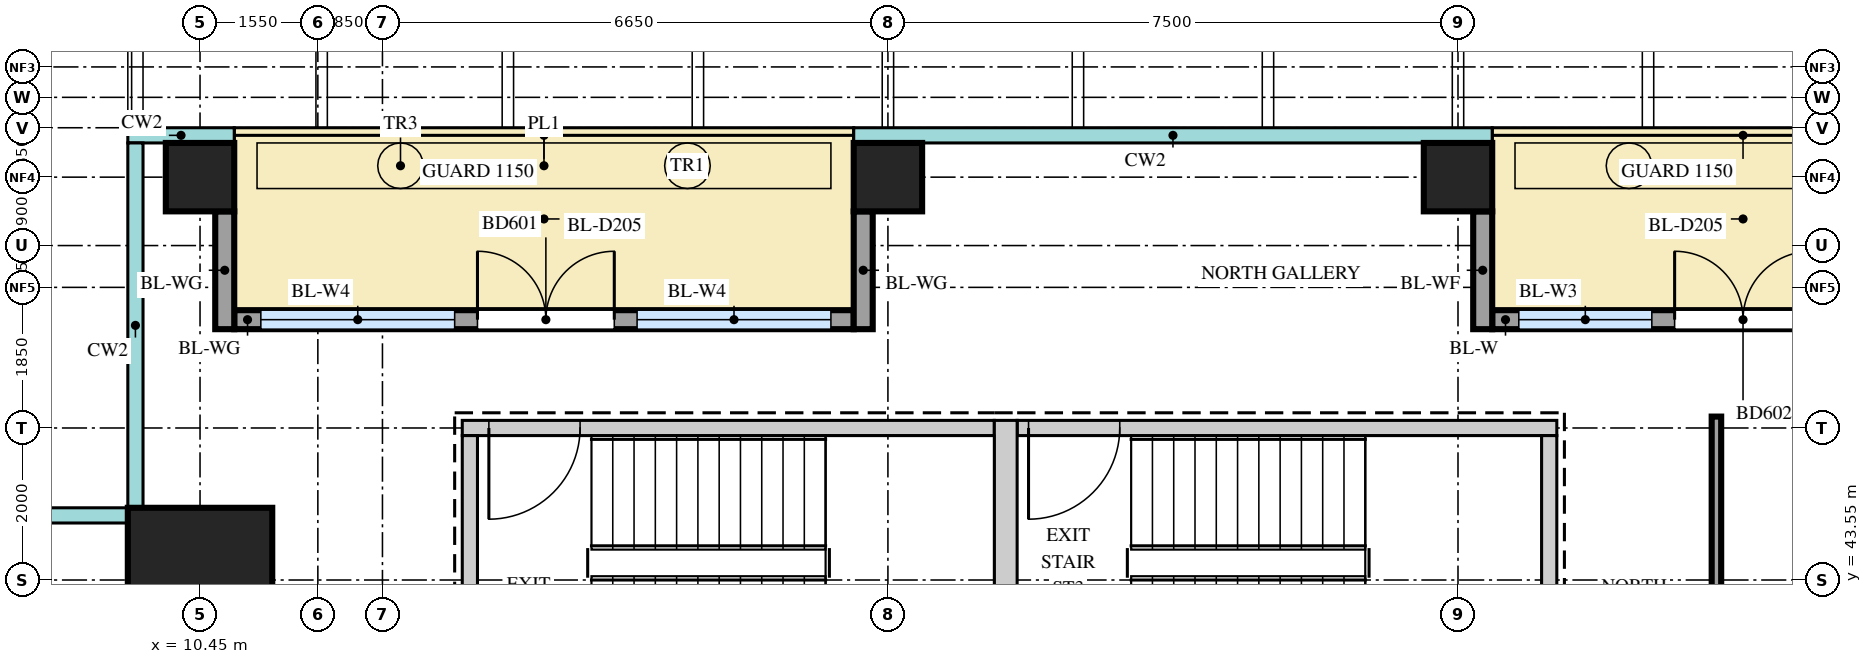
"""IFC4 building model, lengths in metres.
Left out: names, types, materials, properties, quantities, classifications, styles, units other than length and angle.
Written with IfcOpenShell. Run it as: python <this file> out.ifc"""

import sys

from ifc_helpers import new_model, si_unit, direction, frame, frame_2d, origin, origin_2d, place, context, subcontext, project, spatial, rectangle, extrude, source, transform, mapped, element, fill, save


model = new_model("IFC4")
c1 = context("Model", 3, precision=1e-05, world=origin(), true_north=direction((0.0, 1.0)))
c2 = subcontext(c1, "Body", "Model", "MODEL_VIEW")
j1 = project(units=[si_unit("LENGTHUNIT", "METRE"), si_unit("PLANEANGLEUNIT", "RADIAN")], contexts=[c1])
p1 = place(None, origin())
s1 = spatial("IfcSite", under=j1, at=p1, CompositionType="ELEMENT")
p2 = place(p1, origin())
s2 = spatial("IfcBuilding", under=s1, at=p2, CompositionType="ELEMENT")
p3 = place(p2, frame((0.0, 0.0, 266.2)))
s3 = spatial("IfcBuildingStorey", under=s2, at=p3, CompositionType="ELEMENT", Elevation=266.2)
m1 = source(origin(), c2, "Body", "SweptSolid", [
    extrude(rectangle(XDim=7.0, YDim=0.2, at=frame_2d((3.5, 0.0))), origin(), (0.0, 0.0, 1.0), 3.75),
])
p4 = place(p3, frame((13.9, 45.55, 0.0), z_axis=(0.0, 0.0, 1.0), x_axis=(1.0, 0.0, 0.0)))
e1 = element("IfcWall", 1, at=p4, inside=s3, PredefinedType="SHEAR", context=c2, shape_type="MappedRepresentation", body=[
    mapped(m1, transform((0.0, 0.0, 0.0))),
])
m2 = source(origin(), c2, "Body", "SweptSolid", [
    extrude(rectangle(XDim=1.2, YDim=2.1, at=frame_2d((0.6, 1.05))), frame((0.0, 0.11, 0.0), z_axis=(0.0, -1.0, 0.0), x_axis=(1.0, 0.0, 0.0)), (0.0, 0.0, 1.0), 0.22),
])
p5 = place(p4, frame((0.35, 0.0, 0.0)))
e2 = element("IfcOpeningElement", 2, at=p5, cuts=e1, PredefinedType="OPENING", context=c2, shape_type="MappedRepresentation", body=[
    mapped(m2, transform((0.0, 0.0, 0.0))),
])
m3 = source(origin(), c2, "Body", "SweptSolid", [
    extrude(rectangle(XDim=7.1, YDim=0.2, at=frame_2d((3.55, 0.0))), origin(), (0.0, 0.0, 1.0), 3.75),
])
p6 = place(p3, frame((21.2, 45.55, 0.0), z_axis=(0.0, 0.0, 1.0), x_axis=(1.0, 0.0, 0.0)))
e3 = element("IfcWall", 3, at=p6, inside=s3, PredefinedType="SHEAR", context=c2, shape_type="MappedRepresentation", body=[
    mapped(m3, transform((0.0, 0.0, 0.0))),
])
p7 = place(p6, frame((0.15, 0.0, 0.0)))
e4 = element("IfcOpeningElement", 4, at=p7, cuts=e3, PredefinedType="OPENING", context=c2, shape_type="MappedRepresentation", body=[
    mapped(m2, transform((0.0, 0.0, 0.0))),
])
m4 = source(origin(), c2, "Body", "SweptSolid", [
    extrude(rectangle(XDim=3.75, YDim=0.3, at=frame_2d((1.875, 0.0))), origin(), (0.0, 0.0, 1.0), 3.75),
])
p8 = place(p3, frame((21.05, 41.9, 0.0), z_axis=(0.0, 0.0, 1.0), x_axis=(0.0, 1.0, 0.0)))
e5 = element("IfcWall", 5, at=p8, inside=s3, PredefinedType="SHEAR", context=c2, shape_type="MappedRepresentation", body=[
    mapped(m4, transform((0.0, 0.0, 0.0))),
])
m5 = source(origin(), c2, "Body", "SweptSolid", [
    extrude(rectangle(XDim=3.35, YDim=0.2, at=frame_2d((1.675, 0.0))), origin(), (0.0, 0.0, 1.0), 3.75),
])
for number, where, z_axis, x_axis in (
    (6, (14.0, 42.1, 0.0), (0.0, 0.0, 1.0), (0.0, 1.0, 0.0)),
    (7, (28.2, 42.1, 0.0), (0.0, 0.0, 1.0), (0.0, 1.0, 0.0)),
):
    element("IfcWall", number, at=place(p3, frame(where, z_axis=z_axis, x_axis=x_axis)), inside=s3, PredefinedType="SHEAR", context=c2, shape_type="MappedRepresentation", body=[
        mapped(m5, transform((0.0, 0.0, 0.0))),
    ])
m6 = source(origin(), c2, "Body", "SweptSolid", [
    extrude(rectangle(XDim=1.9, YDim=1.9, at=origin_2d()), origin(), (0.0, 0.0, 1.0), 4.0),
])
p9 = place(p3, frame((10.45, 43.55, 0.0), z_axis=(0.0, 0.0, 1.0), x_axis=(1.0, 0.0, 0.0)))
e8 = element("IfcColumn", 8, at=p9, inside=s3, PredefinedType="COLUMN", context=c2, shape_type="MappedRepresentation", body=[
    mapped(m6, transform((0.0, 0.0, 0.0))),
])
m7 = source(origin(), c2, "Body", "SweptSolid", [
    extrude(rectangle(XDim=0.9, YDim=0.9, at=origin_2d()), origin(), (0.0, 0.0, 1.0), 3.75),
])
for number, where, z_axis, x_axis in (
    (9, (10.45, 48.85, 0.0), (0.0, 0.0, 1.0), (1.0, 0.0, 0.0)),
    (10, (19.5, 48.85, 0.0), (0.0, 0.0, 1.0), (1.0, 0.0, 0.0)),
    (11, (27.0, 48.85, 0.0), (0.0, 0.0, 1.0), (1.0, 0.0, 0.0)),
):
    element("IfcColumn", number, at=place(p3, frame(where, z_axis=z_axis, x_axis=x_axis)), inside=s3, PredefinedType="COLUMN", context=c2, shape_type="MappedRepresentation", body=[
        mapped(m7, transform((0.0, 0.0, 0.0))),
    ])
m8 = source(origin(), c2, "Body", "SweptSolid", [
    extrude(rectangle(XDim=8.15, YDim=0.25, at=frame_2d((4.075, 0.0))), origin(), (0.0, 0.0, 1.0), 3.35),
])
p10 = place(p3, frame((10.9, 46.975, 0.0), z_axis=(0.0, 0.0, 1.0), x_axis=(1.0, 0.0, 0.0)))
e12 = element("IfcWall", 12, at=p10, inside=s3, PredefinedType="SOLIDWALL", context=c2, shape_type="MappedRepresentation", body=[
    mapped(m8, transform((0.0, 0.0, 0.0))),
])
m9 = source(origin(), c2, "Body", "SweptSolid", [
    extrude(rectangle(XDim=2.55, YDim=2.4, at=frame_2d((1.275, 1.2))), frame((0.0, 0.135, 0.0), z_axis=(0.0, -1.0, 0.0), x_axis=(1.0, 0.0, 0.0)), (0.0, 0.0, 1.0), 0.27),
])
p11 = place(p10, frame((0.35, 0.0, 0.0)))
e13 = element("IfcOpeningElement", 13, at=p11, cuts=e12, PredefinedType="OPENING", context=c2, shape_type="MappedRepresentation", body=[
    mapped(m9, transform((0.0, 0.0, 0.0))),
])
p12 = place(p10, frame((5.3, 0.0, 0.0)))
e14 = element("IfcOpeningElement", 14, at=p12, cuts=e12, PredefinedType="OPENING", context=c2, shape_type="MappedRepresentation", body=[
    mapped(m9, transform((0.0, 0.0, 0.0))),
])
m10 = source(origin(), c2, "Body", "SweptSolid", [
    extrude(rectangle(XDim=1.8, YDim=2.4, at=frame_2d((0.9, 1.2))), frame((0.0, 0.135, 0.0), z_axis=(0.0, -1.0, 0.0), x_axis=(1.0, 0.0, 0.0)), (0.0, 0.0, 1.0), 0.27),
])
p13 = place(p10, frame((3.2, 0.0, 0.0)))
e15 = element("IfcOpeningElement", 15, at=p13, cuts=e12, PredefinedType="OPENING", context=c2, shape_type="MappedRepresentation", body=[
    mapped(m10, transform((0.0, 0.0, 0.0))),
])
m11 = source(origin(), c2, "Body", "SweptSolid", [
    extrude(rectangle(XDim=1.55, YDim=0.25, at=frame_2d((0.775, 0.0))), origin(), (0.0, 0.0, 1.0), 3.35),
])
for number, where, z_axis, x_axis in (
    (16, (10.775, 48.4, 0.0), (0.0, 0.0, 1.0), (0.0, -1.0, 0.0)),
    (17, (19.175, 48.4, 0.0), (0.0, 0.0, 1.0), (0.0, -1.0, 0.0)),
):
    element("IfcWall", number, at=place(p3, frame(where, z_axis=z_axis, x_axis=x_axis)), inside=s3, PredefinedType="SOLIDWALL", context=c2, shape_type="MappedRepresentation", body=[
        mapped(m11, transform((0.0, 0.0, 0.0))),
    ])
m12 = source(origin(), c2, "Body", "SweptSolid", [
    extrude(rectangle(XDim=6.6, YDim=0.25, at=frame_2d((3.3, 0.0))), origin(), (0.0, 0.0, 1.0), 3.75),
])
p14 = place(p3, frame((27.45, 46.975, 0.0), z_axis=(0.0, 0.0, 1.0), x_axis=(1.0, 0.0, 0.0)))
e18 = element("IfcWall", 18, at=p14, inside=s3, PredefinedType="SOLIDWALL", context=c2, shape_type="MappedRepresentation", body=[
    mapped(m12, transform((0.0, 0.0, 0.0))),
])
m13 = source(origin(), c2, "Body", "SweptSolid", [
    extrude(rectangle(XDim=1.75, YDim=2.4, at=frame_2d((0.875, 1.2))), frame((0.0, 0.135, 0.0), z_axis=(0.0, -1.0, 0.0), x_axis=(1.0, 0.0, 0.0)), (0.0, 0.0, 1.0), 0.27),
])
p15 = place(p14, frame((0.35, 0.0, 0.0)))
e19 = element("IfcOpeningElement", 19, at=p15, cuts=e18, PredefinedType="OPENING", context=c2, shape_type="MappedRepresentation", body=[
    mapped(m13, transform((0.0, 0.0, 0.0))),
])
p16 = place(p14, frame((4.5, 0.0, 0.0)))
e20 = element("IfcOpeningElement", 20, at=p16, cuts=e18, PredefinedType="OPENING", context=c2, shape_type="MappedRepresentation", body=[
    mapped(m13, transform((0.0, 0.0, 0.0))),
])
p17 = place(p14, frame((2.4, 0.0, 0.0)))
e21 = element("IfcOpeningElement", 21, at=p17, cuts=e18, PredefinedType="OPENING", context=c2, shape_type="MappedRepresentation", body=[
    mapped(m10, transform((0.0, 0.0, 0.0))),
])
m14 = source(origin(), c2, "Body", "SweptSolid", [
    extrude(rectangle(XDim=1.55, YDim=0.25, at=frame_2d((0.775, 0.0))), origin(), (0.0, 0.0, 1.0), 3.45),
])
p18 = place(p3, frame((27.325, 48.4, 0.0), z_axis=(0.0, 0.0, 1.0), x_axis=(0.0, -1.0, 0.0)))
e22 = element("IfcWall", 22, at=p18, inside=s3, PredefinedType="SOLIDWALL", context=c2, shape_type="MappedRepresentation", body=[
    mapped(m14, transform((0.0, 0.0, 0.0))),
])
m15 = source(origin(), c2, "Body", "SweptSolid", [
    extrude(rectangle(XDim=6.6, YDim=0.125, at=frame_2d((3.3, 0.0))), origin(), (0.0, 0.0, 1.0), 3.8),
])
p19 = place(p3, frame((30.4, 39.1, 0.0), z_axis=(0.0, 0.0, 1.0), x_axis=(0.0, 1.0, 0.0)))
e23 = element("IfcWall", 23, at=p19, inside=s3, PredefinedType="PARTITIONING", context=c2, shape_type="MappedRepresentation", body=[
    mapped(m15, transform((0.0, 0.0, 0.0))),
])
m16 = source(origin(), c2, "Body", "SweptSolid", [
    extrude(rectangle(XDim=2.55, YDim=2.4, at=frame_2d((1.275, 1.2))), frame((0.0, 0.03, 0.0), z_axis=(0.0, -1.0, 0.0), x_axis=(1.0, 0.0, 0.0)), (0.0, 0.0, 1.0), 0.06),
])
p20 = place(p11, origin())
e24 = element("IfcWindow", 24, at=p20, inside=s3, PartitioningType="SINGLE_PANEL", PredefinedType="WINDOW", context=c2, shape_type="MappedRepresentation", body=[
    mapped(m16, transform((0.0, 0.0, 0.0))),
])
fill(e13, e24)
p21 = place(p12, origin())
e25 = element("IfcWindow", 25, at=p21, inside=s3, PartitioningType="SINGLE_PANEL", PredefinedType="WINDOW", context=c2, shape_type="MappedRepresentation", body=[
    mapped(m16, transform((0.0, 0.0, 0.0))),
])
fill(e14, e25)
m17 = source(origin(), c2, "Body", "SweptSolid", [
    extrude(rectangle(XDim=1.8, YDim=2.4, at=frame_2d((0.9, 1.2))), frame((0.0, 0.025, 0.0), z_axis=(0.0, -1.0, 0.0), x_axis=(1.0, 0.0, 0.0)), (0.0, 0.0, 1.0), 0.05),
])
p22 = place(p13, origin())
e26 = element("IfcDoor", 26, at=p22, inside=s3, OperationType="DOUBLE_DOOR_DOUBLE_SWING", PredefinedType="DOOR", context=c2, shape_type="MappedRepresentation", body=[
    mapped(m17, transform((0.0, 0.0, 0.0))),
])
fill(e15, e26)
m18 = source(origin(), c2, "Body", "SweptSolid", [
    extrude(rectangle(XDim=1.75, YDim=2.4, at=frame_2d((0.875, 1.2))), frame((0.0, 0.03, 0.0), z_axis=(0.0, -1.0, 0.0), x_axis=(1.0, 0.0, 0.0)), (0.0, 0.0, 1.0), 0.06),
])
p23 = place(p15, origin())
e27 = element("IfcWindow", 27, at=p23, inside=s3, PartitioningType="SINGLE_PANEL", PredefinedType="WINDOW", context=c2, shape_type="MappedRepresentation", body=[
    mapped(m18, transform((0.0, 0.0, 0.0))),
])
fill(e19, e27)
p24 = place(p17, origin())
e28 = element("IfcDoor", 28, at=p24, inside=s3, OperationType="DOUBLE_DOOR_DOUBLE_SWING", PredefinedType="DOOR", context=c2, shape_type="MappedRepresentation", body=[
    mapped(m17, transform((0.0, 0.0, 0.0))),
])
fill(e21, e28)
m19 = source(origin(), c2, "Body", "SweptSolid", [
    extrude(rectangle(XDim=1.2, YDim=2.1, at=frame_2d((0.6, 1.05))), frame((0.0, 0.025, 0.0), z_axis=(0.0, -1.0, 0.0), x_axis=(1.0, 0.0, 0.0)), (0.0, 0.0, 1.0), 0.05),
])
p25 = place(p5, origin())
e29 = element("IfcDoor", 29, at=p25, inside=s3, OperationType="SINGLE_SWING_LEFT", PredefinedType="DOOR", context=c2, shape_type="MappedRepresentation", body=[
    mapped(m19, transform((0.0, 0.0, 0.0))),
])
fill(e2, e29)
p26 = place(p7, origin())
e30 = element("IfcDoor", 30, at=p26, inside=s3, OperationType="SINGLE_SWING_LEFT", PredefinedType="DOOR", context=c2, shape_type="MappedRepresentation", body=[
    mapped(m19, transform((0.0, 0.0, 0.0))),
])
fill(e4, e30)
save(model, sys.argv[1])
